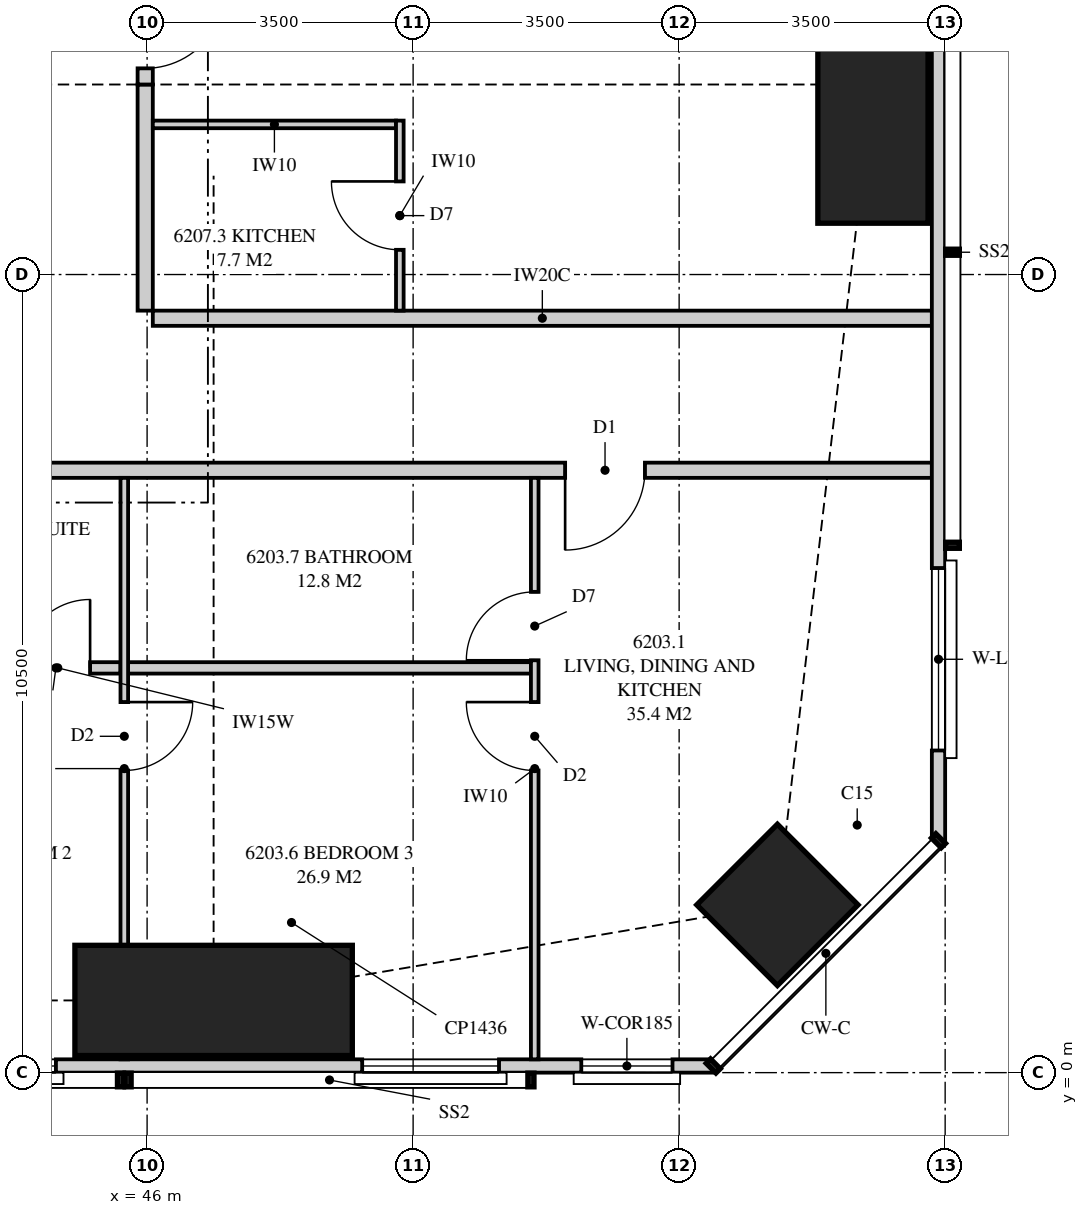
"""IFC4 building model, lengths in metres.
Left out: names, types, materials, properties, quantities, classifications, styles, units other than length and angle.
Written with IfcOpenShell. Run it as: python <this file> out.ifc"""

import sys

from ifc_helpers import new_model, si_unit, direction, frame, frame_2d, origin, origin_2d, place, context, subcontext, project, spatial, polyline, rectangle, outline, extrude, element, fill, save


model = new_model("IFC4")
c1 = context("Model", 3, precision=1e-05, world=origin(), true_north=direction((0.0, 1.0)))
c2 = subcontext(c1, "Body", "Model", "MODEL_VIEW")
j1 = project(units=[si_unit("LENGTHUNIT", "METRE"), si_unit("PLANEANGLEUNIT", "RADIAN")], contexts=[c1])
p1 = place(None, origin())
s1 = spatial("IfcSite", under=j1, at=p1, CompositionType="ELEMENT")
p2 = place(p1, origin())
s2 = spatial("IfcBuilding", under=s1, at=p2, CompositionType="ELEMENT")
p3 = place(p2, frame((0.0, 0.0, 228.45)))
s3 = spatial("IfcBuildingStorey", under=s2, at=p3, CompositionType="ELEMENT", Elevation=228.45)
p4 = place(p3, frame((46.875, 0.95, 0.0), z_axis=(0.0, 0.0, 1.0), x_axis=(0.0, 1.0, 0.0)))
e1 = element("IfcColumn", 1, at=p4, inside=s3, PredefinedType="COLUMN", context=c2, shape_type="SweptSolid", body=[
    extrude(rectangle(XDim=1.45, YDim=3.65, at=origin_2d()), origin(), (0.0, 0.0, 1.0), 3.5),
])
p5 = place(p3, frame((54.293, 2.207, 0.0), z_axis=(0.0, 0.0, 1.0), x_axis=(0.707106781187, 0.707106781187, 0.0)))
e2 = element("IfcColumn", 2, at=p5, inside=s3, PredefinedType="COLUMN", context=c2, shape_type="SweptSolid", body=[
    extrude(rectangle(XDim=1.5, YDim=1.5, at=origin_2d()), origin(), (0.0, 0.0, 1.0), 3.5),
])
p6 = place(p3, frame((55.55, 13.0, 0.0), z_axis=(0.0, 0.0, 1.0), x_axis=(1.0, 0.0, 0.0)))
e3 = element("IfcColumn", 3, at=p6, inside=s3, PredefinedType="COLUMN", context=c2, shape_type="SweptSolid", body=[
    extrude(rectangle(XDim=1.45, YDim=3.65, at=origin_2d()), origin(), (0.0, 0.0, 1.0), 3.5),
])
p7 = place(p3, frame((19.851, 0.087, 0.0), z_axis=(0.0, 0.0, 1.0), x_axis=(1.0, 0.0, 0.0)))
e4 = element("IfcWall", 4, at=p7, inside=s3, PredefinedType="SOLIDWALL", context=c2, shape_type="SweptSolid", body=[
    extrude(outline(polyline([(0.0, 0.0), (33.597, 0.0), (33.597, 3.26), (27.239, 3.26), (27.239, 2.3), (27.155, 2.3), (27.155, 3.26), (27.024, 3.26), (27.024, 2.3), (7.774, 2.3), (7.774, 3.26), (7.642, 3.26), (7.642, 2.3), (7.559, 2.3), (7.559, 3.26), (0.0, 3.26), (0.0, 0.0)])), frame((0.0, 0.087, 0.0), z_axis=(0.0, -1.0, 0.0), x_axis=(1.0, 0.0, 0.0)), (0.0, 0.0, 1.0), 0.175),
])
p8 = place(p7, frame((3.373, 0.0, 0.4)))
e5 = element("IfcOpeningElement", 5, at=p8, cuts=e4, PredefinedType="OPENING", context=c2, shape_type="SweptSolid", body=[
    extrude(rectangle(XDim=2.4, YDim=1.85, at=frame_2d((1.2, 0.925))), frame((0.0, 0.097, 0.0), z_axis=(0.0, -1.0, 0.0), x_axis=(1.0, 0.0, 0.0)), (0.0, 0.0, 1.0), 0.195),
])
p9 = place(p7, frame((10.349, 0.0, 0.4)))
e6 = element("IfcOpeningElement", 6, at=p9, cuts=e4, PredefinedType="OPENING", context=c2, shape_type="SweptSolid", body=[
    extrude(rectangle(XDim=1.8, YDim=1.85, at=frame_2d((0.9, 0.925))), frame((0.0, 0.097, 0.0), z_axis=(0.0, -1.0, 0.0), x_axis=(1.0, 0.0, 0.0)), (0.0, 0.0, 1.0), 0.195),
])
p10 = place(p7, frame((13.289, 0.0, 0.0)))
e7 = element("IfcOpeningElement", 7, at=p10, cuts=e4, PredefinedType="OPENING", context=c2, shape_type="SweptSolid", body=[
    extrude(rectangle(XDim=1.8, YDim=2.25, at=frame_2d((0.9, 1.125))), frame((0.0, 0.097, 0.0), z_axis=(0.0, -1.0, 0.0), x_axis=(1.0, 0.0, 0.0)), (0.0, 0.0, 1.0), 0.195),
])
p11 = place(p7, frame((19.549, 0.0, 0.4)))
e8 = element("IfcOpeningElement", 8, at=p11, cuts=e4, PredefinedType="OPENING", context=c2, shape_type="SweptSolid", body=[
    extrude(rectangle(XDim=1.8, YDim=1.85, at=frame_2d((0.9, 0.925))), frame((0.0, 0.097, 0.0), z_axis=(0.0, -1.0, 0.0), x_axis=(1.0, 0.0, 0.0)), (0.0, 0.0, 1.0), 0.195),
])
p12 = place(p7, frame((23.149, 0.0, 0.4)))
e9 = element("IfcOpeningElement", 9, at=p12, cuts=e4, PredefinedType="OPENING", context=c2, shape_type="SweptSolid", body=[
    extrude(rectangle(XDim=1.8, YDim=1.85, at=frame_2d((0.9, 0.925))), frame((0.0, 0.097, 0.0), z_axis=(0.0, -1.0, 0.0), x_axis=(1.0, 0.0, 0.0)), (0.0, 0.0, 1.0), 0.195),
])
p13 = place(p7, frame((28.979, 0.0, 0.4)))
e10 = element("IfcOpeningElement", 10, at=p13, cuts=e4, PredefinedType="OPENING", context=c2, shape_type="SweptSolid", body=[
    extrude(rectangle(XDim=1.8, YDim=1.85, at=frame_2d((0.9, 0.925))), frame((0.0, 0.097, 0.0), z_axis=(0.0, -1.0, 0.0), x_axis=(1.0, 0.0, 0.0)), (0.0, 0.0, 1.0), 0.195),
])
p14 = place(p7, frame((31.861, 0.0, 0.4)))
e11 = element("IfcOpeningElement", 11, at=p14, cuts=e4, PredefinedType="OPENING", context=c2, shape_type="SweptSolid", body=[
    extrude(rectangle(XDim=1.2, YDim=1.85, at=frame_2d((0.6, 0.925))), frame((0.0, 0.097, 0.0), z_axis=(0.0, -1.0, 0.0), x_axis=(1.0, 0.0, 0.0)), (0.0, 0.0, 1.0), 0.195),
])
p15 = place(p3, frame((56.413, 3.051, 0.0), z_axis=(0.0, 0.0, 1.0), x_axis=(0.0, 1.0, 0.0)))
e12 = element("IfcWall", 12, at=p15, inside=s3, PredefinedType="SOLIDWALL", context=c2, shape_type="SweptSolid", body=[
    extrude(outline(polyline([(0.0, 0.0), (27.897, 0.0), (27.897, 3.26), (22.157, 3.26), (22.157, 2.3), (22.092, 2.3), (22.092, 3.26), (21.949, 3.26), (21.949, 2.3), (9.949, 2.3), (9.949, 3.26), (9.858, 3.26), (9.858, 2.3), (9.688, 2.3), (9.688, 3.26), (0.0, 3.26), (0.0, 0.0)])), frame((0.0, 0.087, 0.0), z_axis=(0.0, -1.0, 0.0), x_axis=(1.0, 0.0, 0.0)), (0.0, 0.0, 1.0), 0.175),
])
p16 = place(p15, frame((1.187, 0.0, 0.4)))
e13 = element("IfcOpeningElement", 13, at=p16, cuts=e12, PredefinedType="OPENING", context=c2, shape_type="SweptSolid", body=[
    extrude(rectangle(XDim=2.4, YDim=1.85, at=frame_2d((1.2, 0.925))), frame((0.0, 0.097, 0.0), z_axis=(0.0, -1.0, 0.0), x_axis=(1.0, 0.0, 0.0)), (0.0, 0.0, 1.0), 0.195),
])
p17 = place(p15, frame((11.897, 0.0, 0.4)))
e14 = element("IfcOpeningElement", 14, at=p17, cuts=e12, PredefinedType="OPENING", context=c2, shape_type="SweptSolid", body=[
    extrude(rectangle(XDim=1.8, YDim=1.85, at=frame_2d((0.9, 0.925))), frame((0.0, 0.097, 0.0), z_axis=(0.0, -1.0, 0.0), x_axis=(1.0, 0.0, 0.0)), (0.0, 0.0, 1.0), 0.195),
])
p18 = place(p15, frame((14.824, 0.0, 0.0)))
e15 = element("IfcOpeningElement", 15, at=p18, cuts=e12, PredefinedType="OPENING", context=c2, shape_type="SweptSolid", body=[
    extrude(rectangle(XDim=1.8, YDim=2.25, at=frame_2d((0.9, 1.125))), frame((0.0, 0.097, 0.0), z_axis=(0.0, -1.0, 0.0), x_axis=(1.0, 0.0, 0.0)), (0.0, 0.0, 1.0), 0.195),
])
p19 = place(p15, frame((18.224, 0.0, 0.4)))
e16 = element("IfcOpeningElement", 16, at=p19, cuts=e12, PredefinedType="OPENING", context=c2, shape_type="SweptSolid", body=[
    extrude(rectangle(XDim=1.8, YDim=1.85, at=frame_2d((0.9, 0.925))), frame((0.0, 0.097, 0.0), z_axis=(0.0, -1.0, 0.0), x_axis=(1.0, 0.0, 0.0)), (0.0, 0.0, 1.0), 0.195),
])
p20 = place(p3, frame((46.075, 9.925, 0.0), z_axis=(0.0, 0.0, 1.0), x_axis=(1.0, 0.0, 0.0)))
e17 = element("IfcWall", 17, at=p20, inside=s3, PredefinedType="PARTITIONING", context=c2, shape_type="SweptSolid", body=[
    extrude(outline(polyline([(0.0, 0.0), (10.25, 0.0), (10.25, 3.26), (10.033, 3.26), (10.033, 2.3), (8.201, 2.3), (8.201, 3.26), (2.11, 3.26), (2.11, 2.66), (0.0, 2.66), (0.0, 3.26), (0.0, 0.0)])), frame((0.0, 0.1, 0.0), z_axis=(0.0, -1.0, 0.0), x_axis=(1.0, 0.0, 0.0)), (0.0, 0.0, 1.0), 0.2),
])
p21 = place(p3, frame((38.6, 7.925, 0.0), z_axis=(0.0, 0.0, 1.0), x_axis=(1.0, 0.0, 0.0)))
e18 = element("IfcWall", 18, at=p21, inside=s3, PredefinedType="PARTITIONING", context=c2, shape_type="SweptSolid", body=[
    extrude(outline(polyline([(0.0, 0.0), (17.725, 0.0), (17.725, 3.26), (17.275, 3.26), (17.275, 2.3), (15.443, 2.3), (15.443, 3.26), (9.585, 3.26), (9.585, 2.66), (6.965, 2.66), (6.965, 3.26), (0.0, 3.26), (0.0, 0.0)])), frame((0.0, 0.1, 0.0), z_axis=(0.0, -1.0, 0.0), x_axis=(1.0, 0.0, 0.0)), (0.0, 0.0, 1.0), 0.2),
])
p22 = place(p21, frame((12.9, 0.0, 0.0)))
e19 = element("IfcOpeningElement", 19, at=p22, cuts=e18, PredefinedType="OPENING", context=c2, shape_type="SweptSolid", body=[
    extrude(rectangle(XDim=1.05, YDim=2.2, at=frame_2d((0.525, 1.1))), frame((0.0, 0.11, 0.0), z_axis=(0.0, -1.0, 0.0), x_axis=(1.0, 0.0, 0.0)), (0.0, 0.0, 1.0), 0.22),
])
p23 = place(p3, frame((45.7, 0.175, 0.0), z_axis=(0.0, 0.0, 1.0), x_axis=(0.0, 1.0, 0.0)))
e20 = element("IfcWall", 20, at=p23, inside=s3, PredefinedType="PARTITIONING", context=c2, shape_type="SweptSolid", body=[
    extrude(outline(polyline([(0.529, 2.3), (0.0, 2.3), (0.0, 0.0), (0.529, 0.0), (0.529, 0.31), (1.021, 0.31), (1.021, 0.0), (7.65, 0.0), (7.65, 2.66), (1.635, 2.66), (1.635, 2.3), (1.021, 2.3), (1.021, 1.99), (0.529, 1.99), (0.529, 2.3)])), frame((0.0, 0.05, 0.0), z_axis=(0.0, -1.0, 0.0), x_axis=(1.0, 0.0, 0.0)), (0.0, 0.0, 1.0), 0.1),
])
p24 = place(p23, frame((3.8, 0.0, 0.0)))
e21 = element("IfcOpeningElement", 21, at=p24, cuts=e20, PredefinedType="OPENING", context=c2, shape_type="SweptSolid", body=[
    extrude(rectangle(XDim=0.9, YDim=2.1, at=frame_2d((0.45, 1.05))), frame((0.0, 0.06, 0.0), z_axis=(0.0, -1.0, 0.0), x_axis=(1.0, 0.0, 0.0)), (0.0, 0.0, 1.0), 0.12),
])
p25 = place(p3, frame((51.1, 0.175, 0.0), z_axis=(0.0, 0.0, 1.0), x_axis=(0.0, 1.0, 0.0)))
e22 = element("IfcWall", 22, at=p25, inside=s3, PredefinedType="PARTITIONING", context=c2, shape_type="SweptSolid", body=[
    extrude(outline(polyline([(0.0, 0.0), (7.65, 0.0), (7.65, 3.26), (2.363, 3.26), (2.363, 2.3), (0.619, 2.3), (0.619, 3.26), (0.0, 3.26), (0.0, 0.0)])), frame((0.0, 0.05, 0.0), z_axis=(0.0, -1.0, 0.0), x_axis=(1.0, 0.0, 0.0)), (0.0, 0.0, 1.0), 0.1),
])
p26 = place(p25, frame((3.8, 0.0, 0.0)))
e23 = element("IfcOpeningElement", 23, at=p26, cuts=e22, PredefinedType="OPENING", context=c2, shape_type="SweptSolid", body=[
    extrude(rectangle(XDim=0.9, YDim=2.1, at=frame_2d((0.45, 1.05))), frame((0.0, 0.06, 0.0), z_axis=(0.0, -1.0, 0.0), x_axis=(1.0, 0.0, 0.0)), (0.0, 0.0, 1.0), 0.12),
])
p27 = place(p25, frame((5.25, 0.0, 0.0)))
e24 = element("IfcOpeningElement", 24, at=p27, cuts=e22, PredefinedType="OPENING", context=c2, shape_type="SweptSolid", body=[
    extrude(rectangle(XDim=0.9, YDim=2.1, at=frame_2d((0.45, 1.05))), frame((0.0, 0.06, 0.0), z_axis=(0.0, -1.0, 0.0), x_axis=(1.0, 0.0, 0.0)), (0.0, 0.0, 1.0), 0.12),
])
p28 = place(p3, frame((42.15, 5.325, 0.0), z_axis=(0.0, 0.0, 1.0), x_axis=(1.0, 0.0, 0.0)))
e25 = element("IfcWall", 25, at=p28, inside=s3, PredefinedType="PLUMBINGWALL", context=c2, shape_type="SweptSolid", body=[
    extrude(outline(polyline([(0.0, 0.0), (3.5, 0.0), (3.5, 3.26), (3.5, 2.66), (3.44, 2.66), (3.44, 3.26), (0.0, 3.26), (0.0, 0.0)])), frame((0.0, 0.075, 0.0), z_axis=(0.0, -1.0, 0.0), x_axis=(1.0, 0.0, 0.0)), (0.0, 0.0, 1.0), 0.15),
])
p29 = place(p28, frame((2.2, 0.0, 0.0)))
e26 = element("IfcOpeningElement", 26, at=p29, cuts=e25, PredefinedType="OPENING", context=c2, shape_type="SweptSolid", body=[
    extrude(rectangle(XDim=0.9, YDim=2.1, at=frame_2d((0.45, 1.05))), frame((0.0, 0.085, 0.0), z_axis=(0.0, -1.0, 0.0), x_axis=(1.0, 0.0, 0.0)), (0.0, 0.0, 1.0), 0.17),
])
p30 = place(p3, frame((45.75, 5.325, 0.0), z_axis=(0.0, 0.0, 1.0), x_axis=(1.0, 0.0, 0.0)))
e27 = element("IfcWall", 27, at=p30, inside=s3, PredefinedType="PLUMBINGWALL", context=c2, shape_type="SweptSolid", body=[
    extrude(outline(polyline([(0.0, 0.0), (5.3, 0.0), (5.3, 3.26), (2.41, 3.26), (2.41, 2.66), (0.0, 2.66), (0.0, 3.26), (0.0, 0.0)])), frame((0.0, 0.075, 0.0), z_axis=(0.0, -1.0, 0.0), x_axis=(1.0, 0.0, 0.0)), (0.0, 0.0, 1.0), 0.15),
])
p31 = place(p3, frame((45.975, 10.025, 0.0), z_axis=(0.0, 0.0, 1.0), x_axis=(0.0, 1.0, 0.0)))
e28 = element("IfcWall", 28, at=p31, inside=s3, PredefinedType="PARTITIONING", context=c2, shape_type="SweptSolid", body=[
    extrude(rectangle(XDim=2.975, YDim=0.2, at=frame_2d((1.488, 0.0))), origin(), (0.0, 0.0, 1.0), 2.66),
])
p32 = place(p3, frame((45.975, 13.0, 0.0), z_axis=(0.0, 0.0, 1.0), x_axis=(0.0, 1.0, 0.0)))
e29 = element("IfcWall", 29, at=p32, inside=s3, PredefinedType="PARTITIONING", context=c2, shape_type="SweptSolid", body=[
    extrude(outline(polyline([(0.0, 0.0), (4.4, 0.0), (4.4, 3.26), (1.31, 3.26), (1.31, 2.66), (0.0, 2.66), (0.0, 0.0)])), frame((0.0, 0.1, 0.0), z_axis=(0.0, -1.0, 0.0), x_axis=(1.0, 0.0, 0.0)), (0.0, 0.0, 1.0), 0.2),
])
p33 = place(p32, frame((0.212, 0.0, 0.0)))
e30 = element("IfcOpeningElement", 30, at=p33, cuts=e29, PredefinedType="OPENING", context=c2, shape_type="SweptSolid", body=[
    extrude(rectangle(XDim=1.05, YDim=2.2, at=frame_2d((0.525, 1.1))), frame((0.0, 0.11, 0.0), z_axis=(0.0, -1.0, 0.0), x_axis=(1.0, 0.0, 0.0)), (0.0, 0.0, 1.0), 0.22),
])
p34 = place(p3, frame((49.325, 10.025, 0.0), z_axis=(0.0, 0.0, 1.0), x_axis=(0.0, 1.0, 0.0)))
e31 = element("IfcWall", 31, at=p34, inside=s3, PredefinedType="PARTITIONING", context=c2, shape_type="SweptSolid", body=[
    extrude(outline(polyline([(0.0, 0.0), (2.5, 0.0), (2.5, 3.26), (2.5, 2.66), (1.715, 2.66), (1.715, 3.26), (0.0, 3.26), (0.0, 0.0)])), frame((0.0, 0.05, 0.0), z_axis=(0.0, -1.0, 0.0), x_axis=(1.0, 0.0, 0.0)), (0.0, 0.0, 1.0), 0.1),
])
p35 = place(p34, frame((0.8, 0.0, 0.0)))
e32 = element("IfcOpeningElement", 32, at=p35, cuts=e31, PredefinedType="OPENING", context=c2, shape_type="SweptSolid", body=[
    extrude(rectangle(XDim=0.9, YDim=2.1, at=frame_2d((0.45, 1.05))), frame((0.0, 0.06, 0.0), z_axis=(0.0, -1.0, 0.0), x_axis=(1.0, 0.0, 0.0)), (0.0, 0.0, 1.0), 0.12),
])
p36 = place(p3, frame((46.075, 12.475, 0.0), z_axis=(0.0, 0.0, 1.0), x_axis=(1.0, 0.0, 0.0)))
e33 = element("IfcWall", 33, at=p36, inside=s3, PredefinedType="PARTITIONING", context=c2, shape_type="SweptSolid", body=[
    extrude(outline(polyline([(0.0, 0.0), (3.2, 0.0), (3.2, 3.26), (3.2, 2.66), (2.06, 2.66), (0.0, 2.66), (0.0, 3.26), (0.0, 0.0)])), frame((0.0, 0.05, 0.0), z_axis=(0.0, -1.0, 0.0), x_axis=(1.0, 0.0, 0.0)), (0.0, 0.0, 1.0), 0.1),
])
p37 = place(p12, origin())
e34 = element("IfcWindow", 34, at=p37, inside=s3, PartitioningType="SINGLE_PANEL", PredefinedType="WINDOW", context=c2, shape_type="SweptSolid", body=[
    extrude(rectangle(XDim=1.8, YDim=1.85, at=frame_2d((0.9, 0.925))), frame((0.0, 0.03, 0.0), z_axis=(0.0, -1.0, 0.0), x_axis=(1.0, 0.0, 0.0)), (0.0, 0.0, 1.0), 0.06),
])
fill(e9, e34)
p38 = place(p13, origin())
e35 = element("IfcWindow", 35, at=p38, inside=s3, PartitioningType="SINGLE_PANEL", PredefinedType="WINDOW", context=c2, shape_type="SweptSolid", body=[
    extrude(rectangle(XDim=1.8, YDim=1.85, at=frame_2d((0.9, 0.925))), frame((0.0, 0.03, 0.0), z_axis=(0.0, -1.0, 0.0), x_axis=(1.0, 0.0, 0.0)), (0.0, 0.0, 1.0), 0.06),
])
fill(e10, e35)
p39 = place(p14, origin())
e36 = element("IfcWindow", 36, at=p39, inside=s3, PartitioningType="SINGLE_PANEL", PredefinedType="WINDOW", context=c2, shape_type="SweptSolid", body=[
    extrude(rectangle(XDim=1.2, YDim=1.85, at=frame_2d((0.6, 0.925))), frame((0.0, 0.03, 0.0), z_axis=(0.0, -1.0, 0.0), x_axis=(1.0, 0.0, 0.0)), (0.0, 0.0, 1.0), 0.06),
])
fill(e11, e36)
p40 = place(p16, origin())
e37 = element("IfcWindow", 37, at=p40, inside=s3, PartitioningType="SINGLE_PANEL", PredefinedType="WINDOW", context=c2, shape_type="SweptSolid", body=[
    extrude(rectangle(XDim=2.4, YDim=1.85, at=frame_2d((1.2, 0.925))), frame((0.0, 0.03, 0.0), z_axis=(0.0, -1.0, 0.0), x_axis=(1.0, 0.0, 0.0)), (0.0, 0.0, 1.0), 0.06),
])
fill(e13, e37)
p41 = place(p22, frame((1.05, 0.0, 0.0), z_axis=(0.0, 0.0, 1.0), x_axis=(-1.0, 0.0, 0.0)))
e38 = element("IfcDoor", 38, at=p41, inside=s3, OperationType="SINGLE_SWING_RIGHT", PredefinedType="DOOR", context=c2, shape_type="SweptSolid", body=[
    extrude(rectangle(XDim=1.05, YDim=2.2, at=frame_2d((0.525, 1.1))), frame((0.0, 0.025, 0.0), z_axis=(0.0, -1.0, 0.0), x_axis=(1.0, 0.0, 0.0)), (0.0, 0.0, 1.0), 0.05),
])
fill(e19, e38)
p42 = place(p24, frame((0.9, 0.0, 0.0), z_axis=(0.0, 0.0, 1.0), x_axis=(-1.0, 0.0, 0.0)))
e39 = element("IfcDoor", 39, at=p42, inside=s3, OperationType="SINGLE_SWING_LEFT", PredefinedType="DOOR", context=c2, shape_type="SweptSolid", body=[
    extrude(rectangle(XDim=0.9, YDim=2.1, at=frame_2d((0.45, 1.05))), frame((0.0, 0.025, 0.0), z_axis=(0.0, -1.0, 0.0), x_axis=(1.0, 0.0, 0.0)), (0.0, 0.0, 1.0), 0.05),
])
fill(e21, e39)
p43 = place(p29, origin())
e40 = element("IfcDoor", 40, at=p43, inside=s3, OperationType="SINGLE_SWING_RIGHT", PredefinedType="DOOR", context=c2, shape_type="SweptSolid", body=[
    extrude(rectangle(XDim=0.9, YDim=2.1, at=frame_2d((0.45, 1.05))), frame((0.0, 0.025, 0.0), z_axis=(0.0, -1.0, 0.0), x_axis=(1.0, 0.0, 0.0)), (0.0, 0.0, 1.0), 0.05),
])
fill(e26, e40)
p44 = place(p26, origin())
e41 = element("IfcDoor", 41, at=p44, inside=s3, OperationType="SINGLE_SWING_RIGHT", PredefinedType="DOOR", context=c2, shape_type="SweptSolid", body=[
    extrude(rectangle(XDim=0.9, YDim=2.1, at=frame_2d((0.45, 1.05))), frame((0.0, 0.025, 0.0), z_axis=(0.0, -1.0, 0.0), x_axis=(1.0, 0.0, 0.0)), (0.0, 0.0, 1.0), 0.05),
])
fill(e23, e41)
p45 = place(p27, origin())
e42 = element("IfcDoor", 42, at=p45, inside=s3, OperationType="SINGLE_SWING_LEFT", PredefinedType="DOOR", context=c2, shape_type="SweptSolid", body=[
    extrude(rectangle(XDim=0.9, YDim=2.1, at=frame_2d((0.45, 1.05))), frame((0.0, 0.025, 0.0), z_axis=(0.0, -1.0, 0.0), x_axis=(1.0, 0.0, 0.0)), (0.0, 0.0, 1.0), 0.05),
])
fill(e24, e42)
p46 = place(p33, frame((1.05, 0.0, 0.0), z_axis=(0.0, 0.0, 1.0), x_axis=(-1.0, 0.0, 0.0)))
e43 = element("IfcDoor", 43, at=p46, inside=s3, OperationType="SINGLE_SWING_LEFT", PredefinedType="DOOR", context=c2, shape_type="SweptSolid", body=[
    extrude(rectangle(XDim=1.05, YDim=2.2, at=frame_2d((0.525, 1.1))), frame((0.0, 0.025, 0.0), z_axis=(0.0, -1.0, 0.0), x_axis=(1.0, 0.0, 0.0)), (0.0, 0.0, 1.0), 0.05),
])
fill(e30, e43)
p47 = place(p35, origin())
e44 = element("IfcDoor", 44, at=p47, inside=s3, OperationType="SINGLE_SWING_RIGHT", PredefinedType="DOOR", context=c2, shape_type="SweptSolid", body=[
    extrude(rectangle(XDim=0.9, YDim=2.1, at=frame_2d((0.45, 1.05))), frame((0.0, 0.025, 0.0), z_axis=(0.0, -1.0, 0.0), x_axis=(1.0, 0.0, 0.0)), (0.0, 0.0, 1.0), 0.05),
])
fill(e32, e44)
save(model, sys.argv[1])
